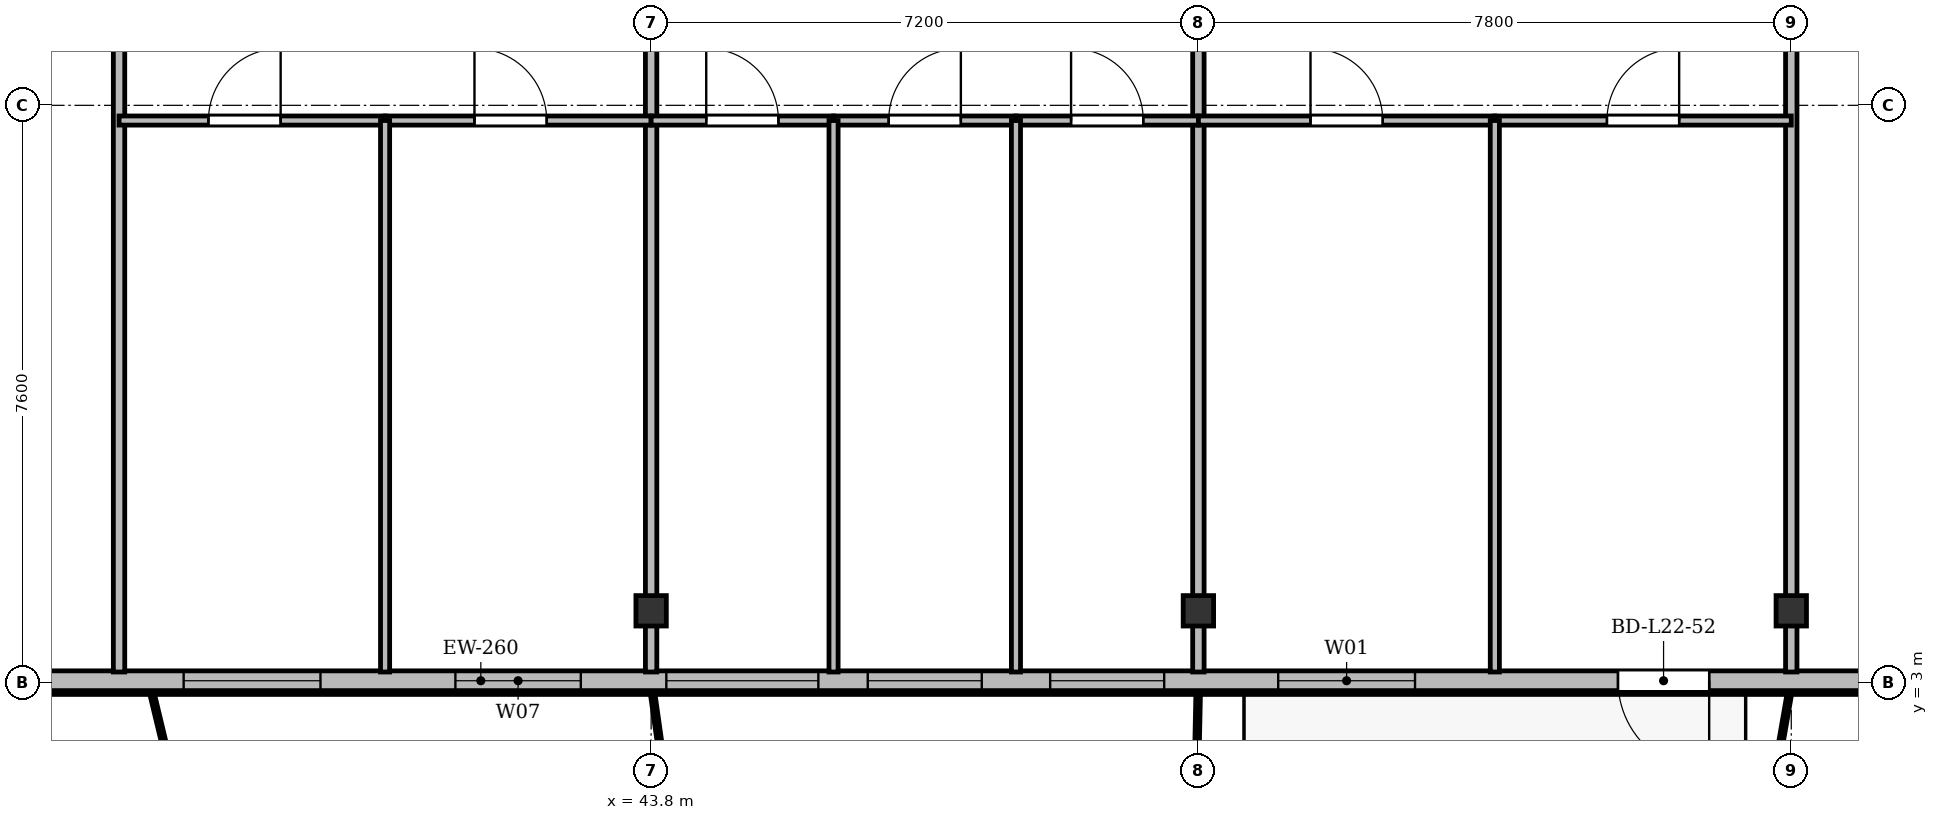
"""IFC4 building model, lengths in metres.
Left out: names, types, materials, properties, quantities, classifications, styles, units other than length and angle.
Written with IfcOpenShell. Run it as: python <this file> out.ifc"""

import sys

from ifc_helpers import new_model, si_unit, direction, frame, frame_2d, origin, origin_2d, place, context, subcontext, project, spatial, rectangle, i_section, extrude, source, transform, mapped, element, fill, save


model = new_model("IFC4")
c1 = context("Model", 3, precision=1e-05, world=origin(), true_north=direction((0.0, 1.0)))
c2 = subcontext(c1, "Body", "Model", "MODEL_VIEW")
j1 = project(units=[si_unit("LENGTHUNIT", "METRE"), si_unit("PLANEANGLEUNIT", "RADIAN")], contexts=[c1])
p1 = place(None, origin())
s1 = spatial("IfcSite", under=j1, at=p1, CompositionType="ELEMENT")
p2 = place(p1, origin())
s2 = spatial("IfcBuilding", under=s1, at=p2, CompositionType="ELEMENT")
p3 = place(p2, frame((0.0, 0.0, 88.9)))
s3 = spatial("IfcBuildingStorey", under=s2, at=p3, CompositionType="ELEMENT", Elevation=88.9)
m1 = source(origin(), c2, "Body", "SweptSolid", [
    extrude(i_section(OverallWidth=0.4, OverallDepth=0.4, WebThickness=0.022, FlangeThickness=0.035, at=origin_2d()), origin(), (0.0, 0.0, 1.0), 3.6),
])
for number, where, z_axis, x_axis in (
    (1, (43.8, 3.95, 0.0), (0.0, 0.0, 1.0), (1.0, 0.0, 0.0)),
    (2, (51.0, 3.95, 0.0), (0.0, 0.0, 1.0), (1.0, 0.0, 0.0)),
    (3, (58.8, 3.95, 0.0), (0.0, 0.0, 1.0), (1.0, 0.0, 0.0)),
):
    element("IfcColumn", number, at=place(p3, frame(where, z_axis=z_axis, x_axis=x_axis)), inside=s3, PredefinedType="COLUMN", context=c2, shape_type="MappedRepresentation", body=[
        mapped(m1, transform((0.0, 0.0, 0.0), x_axis=(1.0, 0.0, 0.0), y_axis=(0.0, 1.0, 0.0), z_axis=(0.0, 0.0, 1.0), scale=1.0)),
    ])
p4 = place(p3, frame((66.9, 3.03, 0.0), z_axis=(0.0, 0.0, 1.0), x_axis=(-1.0, 0.0, 0.0)))
e4 = element("IfcWall", 4, at=p4, inside=s3, PredefinedType="SOLIDWALL", context=c2, shape_type="SweptSolid", body=[
    extrude(rectangle(XDim=59.4, YDim=0.26, at=frame_2d((29.7, 0.0))), origin(), (0.0, 0.0, 1.0), 3.34),
])
p5 = place(p4, frame((0.945, 0.0, 0.9)))
e5 = element("IfcOpeningElement", 5, at=p5, cuts=e4, PredefinedType="OPENING", context=c2, shape_type="SweptSolid", body=[
    extrude(rectangle(XDim=1.5, YDim=1.75, at=frame_2d((0.75, 0.875))), frame((0.0, 0.14, 0.0), z_axis=(0.0, -1.0, 0.0), x_axis=(1.0, 0.0, 0.0)), (0.0, 0.0, 1.0), 0.28),
])
p6 = place(p4, frame((4.7, 0.0, 0.9)))
e6 = element("IfcOpeningElement", 6, at=p6, cuts=e4, PredefinedType="OPENING", context=c2, shape_type="SweptSolid", body=[
    extrude(rectangle(XDim=2.0, YDim=1.95, at=frame_2d((1.0, 0.975))), frame((0.0, 0.14, 0.0), z_axis=(0.0, -1.0, 0.0), x_axis=(1.0, 0.0, 0.0)), (0.0, 0.0, 1.0), 0.28),
])
p7 = place(p4, frame((9.18, 0.0, 0.0)))
e7 = element("IfcOpeningElement", 7, at=p7, cuts=e4, PredefinedType="OPENING", context=c2, shape_type="SweptSolid", body=[
    extrude(rectangle(XDim=1.2, YDim=2.2, at=frame_2d((0.6, 1.1))), frame((0.0, 0.14, 0.0), z_axis=(0.0, -1.0, 0.0), x_axis=(1.0, 0.0, 0.0)), (0.0, 0.0, 1.0), 0.28),
])
p8 = place(p4, frame((13.05, 0.0, 0.9)))
e8 = element("IfcOpeningElement", 8, at=p8, cuts=e4, PredefinedType="OPENING", context=c2, shape_type="SweptSolid", body=[
    extrude(rectangle(XDim=1.8, YDim=1.8, at=frame_2d((0.9, 0.9))), frame((0.0, 0.14, 0.0), z_axis=(0.0, -1.0, 0.0), x_axis=(1.0, 0.0, 0.0)), (0.0, 0.0, 1.0), 0.28),
])
p9 = place(p4, frame((16.35, 0.0, 0.9)))
e9 = element("IfcOpeningElement", 9, at=p9, cuts=e4, PredefinedType="OPENING", context=c2, shape_type="SweptSolid", body=[
    extrude(rectangle(XDim=1.5, YDim=1.75, at=frame_2d((0.75, 0.875))), frame((0.0, 0.14, 0.0), z_axis=(0.0, -1.0, 0.0), x_axis=(1.0, 0.0, 0.0)), (0.0, 0.0, 1.0), 0.28),
])
p10 = place(p4, frame((18.75, 0.0, 0.9)))
e10 = element("IfcOpeningElement", 10, at=p10, cuts=e4, PredefinedType="OPENING", context=c2, shape_type="SweptSolid", body=[
    extrude(rectangle(XDim=1.5, YDim=1.75, at=frame_2d((0.75, 0.875))), frame((0.0, 0.14, 0.0), z_axis=(0.0, -1.0, 0.0), x_axis=(1.0, 0.0, 0.0)), (0.0, 0.0, 1.0), 0.28),
])
p11 = place(p4, frame((20.9, 0.0, 0.9)))
e11 = element("IfcOpeningElement", 11, at=p11, cuts=e4, PredefinedType="OPENING", context=c2, shape_type="SweptSolid", body=[
    extrude(rectangle(XDim=2.0, YDim=1.95, at=frame_2d((1.0, 0.975))), frame((0.0, 0.14, 0.0), z_axis=(0.0, -1.0, 0.0), x_axis=(1.0, 0.0, 0.0)), (0.0, 0.0, 1.0), 0.28),
])
p12 = place(p4, frame((24.025, 0.0, 0.9)))
e12 = element("IfcOpeningElement", 12, at=p12, cuts=e4, PredefinedType="OPENING", context=c2, shape_type="SweptSolid", body=[
    extrude(rectangle(XDim=1.65, YDim=1.85, at=frame_2d((0.825, 0.925))), frame((0.0, 0.14, 0.0), z_axis=(0.0, -1.0, 0.0), x_axis=(1.0, 0.0, 0.0)), (0.0, 0.0, 1.0), 0.28),
])
p13 = place(p4, frame((27.45, 0.0, 0.9)))
e13 = element("IfcOpeningElement", 13, at=p13, cuts=e4, PredefinedType="OPENING", context=c2, shape_type="SweptSolid", body=[
    extrude(rectangle(XDim=1.8, YDim=1.8, at=frame_2d((0.9, 0.9))), frame((0.0, 0.14, 0.0), z_axis=(0.0, -1.0, 0.0), x_axis=(1.0, 0.0, 0.0)), (0.0, 0.0, 1.0), 0.28),
])
p14 = place(p4, frame((32.1, 0.0, 0.9)))
e14 = element("IfcOpeningElement", 14, at=p14, cuts=e4, PredefinedType="OPENING", context=c2, shape_type="SweptSolid", body=[
    extrude(rectangle(XDim=2.2, YDim=1.8, at=frame_2d((1.1, 0.9))), frame((0.0, 0.14, 0.0), z_axis=(0.0, -1.0, 0.0), x_axis=(1.0, 0.0, 0.0)), (0.0, 0.0, 1.0), 0.28),
])
p15 = place(p4, frame((40.301, 0.0, 0.0)))
e15 = element("IfcOpeningElement", 15, at=p15, cuts=e4, PredefinedType="OPENING", context=c2, shape_type="SweptSolid", body=[
    extrude(rectangle(XDim=1.2, YDim=2.2, at=frame_2d((0.6, 1.1))), frame((0.0, 0.14, 0.0), z_axis=(0.0, -1.0, 0.0), x_axis=(1.0, 0.0, 0.0)), (0.0, 0.0, 1.0), 0.28),
])
p16 = place(p4, frame((46.4, 0.0, 0.9)))
e16 = element("IfcOpeningElement", 16, at=p16, cuts=e4, PredefinedType="OPENING", context=c2, shape_type="SweptSolid", body=[
    extrude(rectangle(XDim=2.0, YDim=1.95, at=frame_2d((1.0, 0.975))), frame((0.0, 0.14, 0.0), z_axis=(0.0, -1.0, 0.0), x_axis=(1.0, 0.0, 0.0)), (0.0, 0.0, 1.0), 0.28),
])
p17 = place(p4, frame((54.558, 0.0, 0.0)))
e17 = element("IfcOpeningElement", 17, at=p17, cuts=e4, PredefinedType="OPENING", context=c2, shape_type="SweptSolid", body=[
    extrude(rectangle(XDim=1.2, YDim=2.2, at=frame_2d((0.6, 1.1))), frame((0.0, 0.14, 0.0), z_axis=(0.0, -1.0, 0.0), x_axis=(1.0, 0.0, 0.0)), (0.0, 0.0, 1.0), 0.28),
])
p18 = place(p4, frame((56.905, 0.0, 0.9)))
e18 = element("IfcOpeningElement", 18, at=p18, cuts=e4, PredefinedType="OPENING", context=c2, shape_type="SweptSolid", body=[
    extrude(rectangle(XDim=1.8, YDim=1.8, at=frame_2d((0.9, 0.9))), frame((0.0, 0.14, 0.0), z_axis=(0.0, -1.0, 0.0), x_axis=(1.0, 0.0, 0.0)), (0.0, 0.0, 1.0), 0.28),
])
p19 = place(p3, frame((36.8, 3.145, 0.0), z_axis=(0.0, 0.0, 1.0), x_axis=(0.0, 1.0, 0.0)))
e19 = element("IfcWall", 19, at=p19, inside=s3, PredefinedType="PARTITIONING", context=c2, shape_type="SweptSolid", body=[
    extrude(rectangle(XDim=24.455, YDim=0.15, at=frame_2d((12.228, 0.0))), origin(), (0.0, 0.0, 1.0), 2.752),
])
for number, where, z_axis, x_axis in (
    (20, (43.8, 3.145, 0.0), (0.0, 0.0, 1.0), (0.0, 1.0, 0.0)),
    (21, (51.0, 3.145, 0.0), (0.0, 0.0, 1.0), (0.0, 1.0, 0.0)),
    (22, (58.8, 3.145, 0.0), (0.0, 0.0, 1.0), (0.0, 1.0, 0.0)),
):
    element("IfcWall", number, at=place(p3, frame(where, z_axis=z_axis, x_axis=x_axis)), inside=s3, PredefinedType="PARTITIONING", context=c2, shape_type="SweptSolid", body=[
        extrude(rectangle(XDim=24.455, YDim=0.15, at=frame_2d((12.228, 0.0))), origin(), (0.0, 0.0, 1.0), 2.84),
    ])
p20 = place(p3, frame((36.8, 10.4, 0.0), z_axis=(0.0, 0.0, 1.0), x_axis=(1.0, 0.0, 0.0)))
e23 = element("IfcWall", 23, at=p20, inside=s3, PredefinedType="PARTITIONING", context=c2, shape_type="SweptSolid", body=[
    extrude(rectangle(XDim=3.5, YDim=0.12, at=frame_2d((1.75, 0.0))), origin(), (0.0, 0.0, 1.0), 3.34),
])
p21 = place(p20, frame((1.176, 0.0, 0.0)))
e24 = element("IfcOpeningElement", 24, at=p21, cuts=e23, PredefinedType="OPENING", context=c2, shape_type="SweptSolid", body=[
    extrude(rectangle(XDim=0.95, YDim=2.15, at=frame_2d((0.475, 1.075))), frame((0.0, 0.07, 0.0), z_axis=(0.0, -1.0, 0.0), x_axis=(1.0, 0.0, 0.0)), (0.0, 0.0, 1.0), 0.14),
])
p22 = place(p3, frame((40.3, 10.4, 0.0), z_axis=(0.0, 0.0, 1.0), x_axis=(1.0, 0.0, 0.0)))
e25 = element("IfcWall", 25, at=p22, inside=s3, PredefinedType="PARTITIONING", context=c2, shape_type="SweptSolid", body=[
    extrude(rectangle(XDim=3.5, YDim=0.12, at=frame_2d((1.75, 0.0))), origin(), (0.0, 0.0, 1.0), 2.84),
])
p23 = place(p22, frame((1.176, 0.0, 0.0)))
e26 = element("IfcOpeningElement", 26, at=p23, cuts=e25, PredefinedType="OPENING", context=c2, shape_type="SweptSolid", body=[
    extrude(rectangle(XDim=0.95, YDim=2.15, at=frame_2d((0.475, 1.075))), frame((0.0, 0.07, 0.0), z_axis=(0.0, -1.0, 0.0), x_axis=(1.0, 0.0, 0.0)), (0.0, 0.0, 1.0), 0.14),
])
p24 = place(p3, frame((40.3, 3.145, 0.0), z_axis=(0.0, 0.0, 1.0), x_axis=(0.0, 1.0, 0.0)))
e27 = element("IfcWall", 27, at=p24, inside=s3, PredefinedType="PARTITIONING", context=c2, shape_type="SweptSolid", body=[
    extrude(rectangle(XDim=7.255, YDim=0.12, at=frame_2d((3.627, 0.0))), origin(), (0.0, 0.0, 1.0), 2.752),
])
p25 = place(p3, frame((43.8, 10.4, 0.0), z_axis=(0.0, 0.0, 1.0), x_axis=(1.0, 0.0, 0.0)))
e28 = element("IfcWall", 28, at=p25, inside=s3, PredefinedType="PARTITIONING", context=c2, shape_type="SweptSolid", body=[
    extrude(rectangle(XDim=2.4, YDim=0.12, at=frame_2d((1.2, 0.0))), origin(), (0.0, 0.0, 1.0), 2.84),
])
p26 = place(p25, frame((0.725, 0.0, 0.0)))
e29 = element("IfcOpeningElement", 29, at=p26, cuts=e28, PredefinedType="OPENING", context=c2, shape_type="SweptSolid", body=[
    extrude(rectangle(XDim=0.95, YDim=2.15, at=frame_2d((0.475, 1.075))), frame((0.0, 0.07, 0.0), z_axis=(0.0, -1.0, 0.0), x_axis=(1.0, 0.0, 0.0)), (0.0, 0.0, 1.0), 0.14),
])
p27 = place(p3, frame((46.2, 10.4, 0.0), z_axis=(0.0, 0.0, 1.0), x_axis=(1.0, 0.0, 0.0)))
e30 = element("IfcWall", 30, at=p27, inside=s3, PredefinedType="PARTITIONING", context=c2, shape_type="SweptSolid", body=[
    extrude(rectangle(XDim=2.4, YDim=0.12, at=frame_2d((1.2, 0.0))), origin(), (0.0, 0.0, 1.0), 3.34),
])
p28 = place(p27, frame((0.725, 0.0, 0.0)))
e31 = element("IfcOpeningElement", 31, at=p28, cuts=e30, PredefinedType="OPENING", context=c2, shape_type="SweptSolid", body=[
    extrude(rectangle(XDim=0.95, YDim=2.15, at=frame_2d((0.475, 1.075))), frame((0.0, 0.07, 0.0), z_axis=(0.0, -1.0, 0.0), x_axis=(1.0, 0.0, 0.0)), (0.0, 0.0, 1.0), 0.14),
])
p29 = place(p3, frame((46.2, 3.145, 0.0), z_axis=(0.0, 0.0, 1.0), x_axis=(0.0, 1.0, 0.0)))
e32 = element("IfcWall", 32, at=p29, inside=s3, PredefinedType="PARTITIONING", context=c2, shape_type="SweptSolid", body=[
    extrude(rectangle(XDim=7.255, YDim=0.12, at=frame_2d((3.627, 0.0))), origin(), (0.0, 0.0, 1.0), 2.752),
])
p30 = place(p3, frame((48.6, 10.4, 0.0), z_axis=(0.0, 0.0, 1.0), x_axis=(1.0, 0.0, 0.0)))
e33 = element("IfcWall", 33, at=p30, inside=s3, PredefinedType="PARTITIONING", context=c2, shape_type="SweptSolid", body=[
    extrude(rectangle(XDim=2.4, YDim=0.12, at=frame_2d((1.2, 0.0))), origin(), (0.0, 0.0, 1.0), 2.84),
])
p31 = place(p30, frame((0.725, 0.0, 0.0)))
e34 = element("IfcOpeningElement", 34, at=p31, cuts=e33, PredefinedType="OPENING", context=c2, shape_type="SweptSolid", body=[
    extrude(rectangle(XDim=0.95, YDim=2.15, at=frame_2d((0.475, 1.075))), frame((0.0, 0.07, 0.0), z_axis=(0.0, -1.0, 0.0), x_axis=(1.0, 0.0, 0.0)), (0.0, 0.0, 1.0), 0.14),
])
p32 = place(p3, frame((48.6, 3.145, 0.0), z_axis=(0.0, 0.0, 1.0), x_axis=(0.0, 1.0, 0.0)))
e35 = element("IfcWall", 35, at=p32, inside=s3, PredefinedType="PARTITIONING", context=c2, shape_type="SweptSolid", body=[
    extrude(rectangle(XDim=7.255, YDim=0.12, at=frame_2d((3.627, 0.0))), origin(), (0.0, 0.0, 1.0), 2.752),
])
p33 = place(p3, frame((51.0, 10.4, 0.0), z_axis=(0.0, 0.0, 1.0), x_axis=(1.0, 0.0, 0.0)))
e36 = element("IfcWall", 36, at=p33, inside=s3, PredefinedType="PARTITIONING", context=c2, shape_type="SweptSolid", body=[
    extrude(rectangle(XDim=3.9, YDim=0.12, at=frame_2d((1.95, 0.0))), origin(), (0.0, 0.0, 1.0), 2.84),
])
p34 = place(p33, frame((1.475, 0.0, 0.0)))
e37 = element("IfcOpeningElement", 37, at=p34, cuts=e36, PredefinedType="OPENING", context=c2, shape_type="SweptSolid", body=[
    extrude(rectangle(XDim=0.95, YDim=2.15, at=frame_2d((0.475, 1.075))), frame((0.0, 0.07, 0.0), z_axis=(0.0, -1.0, 0.0), x_axis=(1.0, 0.0, 0.0)), (0.0, 0.0, 1.0), 0.14),
])
p35 = place(p3, frame((54.9, 10.4, 0.0), z_axis=(0.0, 0.0, 1.0), x_axis=(1.0, 0.0, 0.0)))
e38 = element("IfcWall", 38, at=p35, inside=s3, PredefinedType="PARTITIONING", context=c2, shape_type="SweptSolid", body=[
    extrude(rectangle(XDim=3.9, YDim=0.12, at=frame_2d((1.95, 0.0))), origin(), (0.0, 0.0, 1.0), 2.84),
])
p36 = place(p35, frame((1.475, 0.0, 0.0)))
e39 = element("IfcOpeningElement", 39, at=p36, cuts=e38, PredefinedType="OPENING", context=c2, shape_type="SweptSolid", body=[
    extrude(rectangle(XDim=0.95, YDim=2.15, at=frame_2d((0.475, 1.075))), frame((0.0, 0.07, 0.0), z_axis=(0.0, -1.0, 0.0), x_axis=(1.0, 0.0, 0.0)), (0.0, 0.0, 1.0), 0.14),
])
p37 = place(p3, frame((54.9, 3.145, 0.0), z_axis=(0.0, 0.0, 1.0), x_axis=(0.0, 1.0, 0.0)))
e40 = element("IfcWall", 40, at=p37, inside=s3, PredefinedType="PARTITIONING", context=c2, shape_type="SweptSolid", body=[
    extrude(rectangle(XDim=7.255, YDim=0.12, at=frame_2d((3.627, 0.0))), origin(), (0.0, 0.0, 1.0), 2.752),
])
m2 = source(origin(), c2, "Body", "SweptSolid", [
    extrude(rectangle(XDim=1.2, YDim=2.2, at=frame_2d((0.6, 1.1))), frame((0.0, 0.025, 0.0), z_axis=(0.0, -1.0, 0.0), x_axis=(1.0, 0.0, 0.0)), (0.0, 0.0, 1.0), 0.05),
])
p38 = place(p7, origin())
e41 = element("IfcDoor", 41, at=p38, inside=s3, OperationType="SINGLE_SWING_LEFT", PredefinedType="DOOR", context=c2, shape_type="MappedRepresentation", body=[
    mapped(m2, transform((0.0, 0.0, 0.0), x_axis=(1.0, 0.0, 0.0), y_axis=(0.0, 1.0, 0.0), z_axis=(0.0, 0.0, 1.0), scale=1.0)),
])
fill(e7, e41)
m3 = source(origin(), c2, "Body", "SweptSolid", [
    extrude(rectangle(XDim=1.8, YDim=1.8, at=frame_2d((0.9, 0.9))), frame((0.0, 0.03, 0.0), z_axis=(0.0, -1.0, 0.0), x_axis=(1.0, 0.0, 0.0)), (0.0, 0.0, 1.0), 0.06),
])
p39 = place(p8, origin())
e42 = element("IfcWindow", 42, at=p39, inside=s3, PartitioningType="SINGLE_PANEL", PredefinedType="WINDOW", context=c2, shape_type="MappedRepresentation", body=[
    mapped(m3, transform((0.0, 0.0, 0.0), x_axis=(1.0, 0.0, 0.0), y_axis=(0.0, 1.0, 0.0), z_axis=(0.0, 0.0, 1.0), scale=1.0)),
])
fill(e8, e42)
m4 = source(origin(), c2, "Body", "SweptSolid", [
    extrude(rectangle(XDim=1.5, YDim=1.75, at=frame_2d((0.75, 0.875))), frame((0.0, 0.03, 0.0), z_axis=(0.0, -1.0, 0.0), x_axis=(1.0, 0.0, 0.0)), (0.0, 0.0, 1.0), 0.06),
])
p40 = place(p9, origin())
e43 = element("IfcWindow", 43, at=p40, inside=s3, PartitioningType="SINGLE_PANEL", PredefinedType="WINDOW", context=c2, shape_type="MappedRepresentation", body=[
    mapped(m4, transform((0.0, 0.0, 0.0), x_axis=(1.0, 0.0, 0.0), y_axis=(0.0, 1.0, 0.0), z_axis=(0.0, 0.0, 1.0), scale=1.0)),
])
fill(e9, e43)
p41 = place(p10, origin())
e44 = element("IfcWindow", 44, at=p41, inside=s3, PartitioningType="SINGLE_PANEL", PredefinedType="WINDOW", context=c2, shape_type="MappedRepresentation", body=[
    mapped(m4, transform((0.0, 0.0, 0.0), x_axis=(1.0, 0.0, 0.0), y_axis=(0.0, 1.0, 0.0), z_axis=(0.0, 0.0, 1.0), scale=1.0)),
])
fill(e10, e44)
m5 = source(origin(), c2, "Body", "SweptSolid", [
    extrude(rectangle(XDim=2.0, YDim=1.95, at=frame_2d((1.0, 0.975))), frame((0.0, 0.03, 0.0), z_axis=(0.0, -1.0, 0.0), x_axis=(1.0, 0.0, 0.0)), (0.0, 0.0, 1.0), 0.06),
])
p42 = place(p11, origin())
e45 = element("IfcWindow", 45, at=p42, inside=s3, PartitioningType="SINGLE_PANEL", PredefinedType="WINDOW", context=c2, shape_type="MappedRepresentation", body=[
    mapped(m5, transform((0.0, 0.0, 0.0), x_axis=(1.0, 0.0, 0.0), y_axis=(0.0, 1.0, 0.0), z_axis=(0.0, 0.0, 1.0), scale=1.0)),
])
fill(e11, e45)
m6 = source(origin(), c2, "Body", "SweptSolid", [
    extrude(rectangle(XDim=1.65, YDim=1.85, at=frame_2d((0.825, 0.925))), frame((0.0, 0.03, 0.0), z_axis=(0.0, -1.0, 0.0), x_axis=(1.0, 0.0, 0.0)), (0.0, 0.0, 1.0), 0.06),
])
p43 = place(p12, origin())
e46 = element("IfcWindow", 46, at=p43, inside=s3, PartitioningType="SINGLE_PANEL", PredefinedType="WINDOW", context=c2, shape_type="MappedRepresentation", body=[
    mapped(m6, transform((0.0, 0.0, 0.0), x_axis=(1.0, 0.0, 0.0), y_axis=(0.0, 1.0, 0.0), z_axis=(0.0, 0.0, 1.0), scale=1.0)),
])
fill(e12, e46)
p44 = place(p13, origin())
e47 = element("IfcWindow", 47, at=p44, inside=s3, PartitioningType="SINGLE_PANEL", PredefinedType="WINDOW", context=c2, shape_type="MappedRepresentation", body=[
    mapped(m3, transform((0.0, 0.0, 0.0), x_axis=(1.0, 0.0, 0.0), y_axis=(0.0, 1.0, 0.0), z_axis=(0.0, 0.0, 1.0), scale=1.0)),
])
fill(e13, e47)
m7 = source(origin(), c2, "Body", "SweptSolid", [
    extrude(rectangle(XDim=0.95, YDim=2.15, at=frame_2d((0.475, 1.075))), frame((0.0, 0.025, 0.0), z_axis=(0.0, -1.0, 0.0), x_axis=(1.0, 0.0, 0.0)), (0.0, 0.0, 1.0), 0.05),
])
p45 = place(p21, origin())
e48 = element("IfcDoor", 48, at=p45, inside=s3, OperationType="SINGLE_SWING_RIGHT", PredefinedType="DOOR", context=c2, shape_type="MappedRepresentation", body=[
    mapped(m7, transform((0.0, 0.0, 0.0), x_axis=(1.0, 0.0, 0.0), y_axis=(0.0, 1.0, 0.0), z_axis=(0.0, 0.0, 1.0), scale=1.0)),
])
fill(e24, e48)
p46 = place(p23, origin())
e49 = element("IfcDoor", 49, at=p46, inside=s3, OperationType="SINGLE_SWING_LEFT", PredefinedType="DOOR", context=c2, shape_type="MappedRepresentation", body=[
    mapped(m7, transform((0.0, 0.0, 0.0), x_axis=(1.0, 0.0, 0.0), y_axis=(0.0, 1.0, 0.0), z_axis=(0.0, 0.0, 1.0), scale=1.0)),
])
fill(e26, e49)
p47 = place(p26, origin())
e50 = element("IfcDoor", 50, at=p47, inside=s3, OperationType="SINGLE_SWING_LEFT", PredefinedType="DOOR", context=c2, shape_type="MappedRepresentation", body=[
    mapped(m7, transform((0.0, 0.0, 0.0), x_axis=(1.0, 0.0, 0.0), y_axis=(0.0, 1.0, 0.0), z_axis=(0.0, 0.0, 1.0), scale=1.0)),
])
fill(e29, e50)
p48 = place(p28, origin())
e51 = element("IfcDoor", 51, at=p48, inside=s3, OperationType="SINGLE_SWING_RIGHT", PredefinedType="DOOR", context=c2, shape_type="MappedRepresentation", body=[
    mapped(m7, transform((0.0, 0.0, 0.0), x_axis=(1.0, 0.0, 0.0), y_axis=(0.0, 1.0, 0.0), z_axis=(0.0, 0.0, 1.0), scale=1.0)),
])
fill(e31, e51)
p49 = place(p31, origin())
e52 = element("IfcDoor", 52, at=p49, inside=s3, OperationType="SINGLE_SWING_LEFT", PredefinedType="DOOR", context=c2, shape_type="MappedRepresentation", body=[
    mapped(m7, transform((0.0, 0.0, 0.0), x_axis=(1.0, 0.0, 0.0), y_axis=(0.0, 1.0, 0.0), z_axis=(0.0, 0.0, 1.0), scale=1.0)),
])
fill(e34, e52)
p50 = place(p34, origin())
e53 = element("IfcDoor", 53, at=p50, inside=s3, OperationType="SINGLE_SWING_LEFT", PredefinedType="DOOR", context=c2, shape_type="MappedRepresentation", body=[
    mapped(m7, transform((0.0, 0.0, 0.0), x_axis=(1.0, 0.0, 0.0), y_axis=(0.0, 1.0, 0.0), z_axis=(0.0, 0.0, 1.0), scale=1.0)),
])
fill(e37, e53)
p51 = place(p36, origin())
e54 = element("IfcDoor", 54, at=p51, inside=s3, OperationType="SINGLE_SWING_RIGHT", PredefinedType="DOOR", context=c2, shape_type="MappedRepresentation", body=[
    mapped(m7, transform((0.0, 0.0, 0.0), x_axis=(1.0, 0.0, 0.0), y_axis=(0.0, 1.0, 0.0), z_axis=(0.0, 0.0, 1.0), scale=1.0)),
])
fill(e39, e54)
save(model, sys.argv[1])
